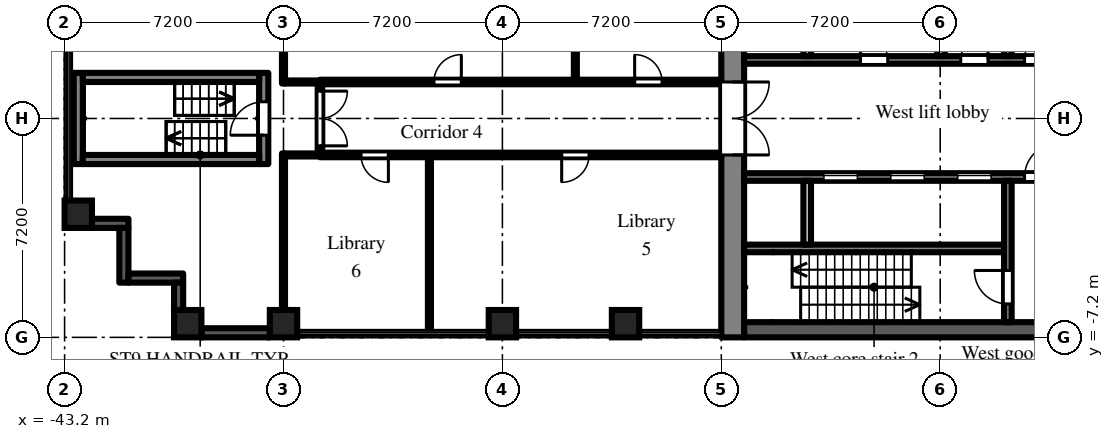
"""IFC4 building model, lengths in metres.
Left out: names, types, materials, properties, quantities, classifications, styles, units other than length and angle.
Written with IfcOpenShell. Run it as: python <this file> out.ifc"""

import sys

from ifc_helpers import new_model, si_unit, direction, frame, frame_2d, origin, origin_2d, place, context, subcontext, project, spatial, rectangle, extrude, element, fill, save


model = new_model("IFC4")
c1 = context("Model", 3, precision=1e-05, world=origin(), true_north=direction((0.0, 1.0)))
c2 = subcontext(c1, "Body", "Model", "MODEL_VIEW")
j1 = project(units=[si_unit("LENGTHUNIT", "METRE"), si_unit("PLANEANGLEUNIT", "RADIAN")], contexts=[c1])
p1 = place(None, origin())
s1 = spatial("IfcSite", under=j1, at=p1, CompositionType="ELEMENT")
p2 = place(p1, origin())
s2 = spatial("IfcBuilding", under=s1, at=p2, CompositionType="ELEMENT")
p3 = place(p2, frame((0.0, 0.0, 7.2)))
s3 = spatial("IfcBuildingStorey", under=s2, at=p3, CompositionType="ELEMENT", Elevation=7.2)
for number, where, z_axis, x_axis in (
    (1, (-42.75, -3.15, 0.0), (0.0, 0.0, 1.0), (1.0, 0.0, 0.0)),
    (2, (-39.15, -6.75, 0.0), (0.0, 0.0, 1.0), (1.0, 0.0, 0.0)),
    (3, (-36.0, -6.75, 0.0), (0.0, 0.0, 1.0), (1.0, 0.0, 0.0)),
    (4, (-28.8, -6.75, 0.0), (0.0, 0.0, 1.0), (1.0, 0.0, 0.0)),
    (5, (-24.75, -6.75, 0.0), (0.0, 0.0, 1.0), (1.0, 0.0, 0.0)),
):
    element("IfcColumn", number, at=place(p3, frame(where, z_axis=z_axis, x_axis=x_axis)), inside=s3, PredefinedType="COLUMN", context=c2, shape_type="SweptSolid", body=[
        extrude(rectangle(XDim=0.9, YDim=0.9, at=origin_2d()), origin(), (0.0, 0.0, 1.0), 4.5),
    ])
p4 = place(p3, frame((-42.3, -3.45, 0.0), z_axis=(0.0, 0.0, 1.0), x_axis=(1.0, 0.0, 0.0)))
e6 = element("IfcWall", 6, at=p4, inside=s3, PredefinedType="SOLIDWALL", context=c2, shape_type="SweptSolid", body=[
    extrude(rectangle(XDim=1.2, YDim=0.3, at=frame_2d((0.6, 0.0))), origin(), (0.0, 0.0, 1.0), 4.075),
])
p5 = place(p3, frame((-41.25, -3.6, 0.0), z_axis=(0.0, 0.0, 1.0), x_axis=(0.0, -1.0, 0.0)))
e7 = element("IfcWall", 7, at=p5, inside=s3, PredefinedType="SOLIDWALL", context=c2, shape_type="SweptSolid", body=[
    extrude(rectangle(XDim=1.8, YDim=0.3, at=frame_2d((0.9, 0.0))), origin(), (0.0, 0.0, 1.0), 4.075),
])
p6 = place(p3, frame((-41.1, -5.25, 0.0), z_axis=(0.0, 0.0, 1.0), x_axis=(1.0, 0.0, 0.0)))
e8 = element("IfcWall", 8, at=p6, inside=s3, PredefinedType="SOLIDWALL", context=c2, shape_type="SweptSolid", body=[
    extrude(rectangle(XDim=1.8, YDim=0.3, at=frame_2d((0.9, 0.0))), origin(), (0.0, 0.0, 1.0), 4.075),
])
p7 = place(p3, frame((-39.45, -5.4, 0.0), z_axis=(0.0, 0.0, 1.0), x_axis=(0.0, -1.0, 0.0)))
e9 = element("IfcWall", 9, at=p7, inside=s3, PredefinedType="SOLIDWALL", context=c2, shape_type="SweptSolid", body=[
    extrude(rectangle(XDim=0.9, YDim=0.3, at=frame_2d((0.45, 0.0))), origin(), (0.0, 0.0, 1.0), 4.075),
])
p8 = place(p3, frame((-38.7, -7.05, 0.0), z_axis=(0.0, 0.0, 1.0), x_axis=(1.0, 0.0, 0.0)))
e10 = element("IfcWall", 10, at=p8, inside=s3, PredefinedType="SOLIDWALL", context=c2, shape_type="SweptSolid", body=[
    extrude(rectangle(XDim=2.25, YDim=0.3, at=frame_2d((1.125, 0.0))), origin(), (0.0, 0.0, 1.0), 3.6),
])
p9 = place(p3, frame((-21.225, -7.2, 0.0), z_axis=(0.0, 0.0, 1.0), x_axis=(0.0, 1.0, 0.0)))
e11 = element("IfcWall", 11, at=p9, inside=s3, PredefinedType="SHEAR", context=c2, shape_type="SweptSolid", body=[
    extrude(rectangle(XDim=14.4, YDim=0.75, at=frame_2d((7.2, 0.0))), origin(), (0.0, 0.0, 1.0), 4.075),
])
p10 = place(p9, frame((6.0, 0.0, 0.0)))
e12 = element("IfcOpeningElement", 12, at=p10, cuts=e11, PredefinedType="OPENING", context=c2, shape_type="SweptSolid", body=[
    extrude(rectangle(XDim=2.4, YDim=2.2, at=frame_2d((1.2, 1.1))), frame((0.0, 0.385, 0.0), z_axis=(0.0, -1.0, 0.0), x_axis=(1.0, 0.0, 0.0)), (0.0, 0.0, 1.0), 0.77),
])
p11 = place(p3, frame((-7.9, 1.925, 0.0), z_axis=(0.0, 0.0, 1.0), x_axis=(-1.0, 0.0, 0.0)))
e13 = element("IfcWall", 13, at=p11, inside=s3, PredefinedType="SHEAR", context=c2, shape_type="SweptSolid", body=[
    extrude(rectangle(XDim=12.95, YDim=0.25, at=frame_2d((6.475, 0.0))), origin(), (0.0, 0.0, 1.0), 4.075),
])
p12 = place(p11, frame((0.525, 0.0, 0.0)))
e14 = element("IfcOpeningElement", 14, at=p12, cuts=e13, PredefinedType="OPENING", context=c2, shape_type="SweptSolid", body=[
    extrude(rectangle(XDim=0.9, YDim=2.1, at=frame_2d((0.45, 1.05))), frame((0.0, 0.135, 0.0), z_axis=(0.0, -1.0, 0.0), x_axis=(1.0, 0.0, 0.0)), (0.0, 0.0, 1.0), 0.27),
])
p13 = place(p11, frame((2.625, 0.0, 0.0)))
e15 = element("IfcOpeningElement", 15, at=p13, cuts=e13, PredefinedType="OPENING", context=c2, shape_type="SweptSolid", body=[
    extrude(rectangle(XDim=1.1, YDim=2.1, at=frame_2d((0.55, 1.05))), frame((0.0, 0.135, 0.0), z_axis=(0.0, -1.0, 0.0), x_axis=(1.0, 0.0, 0.0)), (0.0, 0.0, 1.0), 0.27),
])
p14 = place(p11, frame((4.925, 0.0, 0.0)))
e16 = element("IfcOpeningElement", 16, at=p14, cuts=e13, PredefinedType="OPENING", context=c2, shape_type="SweptSolid", body=[
    extrude(rectangle(XDim=0.9, YDim=2.1, at=frame_2d((0.45, 1.05))), frame((0.0, 0.135, 0.0), z_axis=(0.0, -1.0, 0.0), x_axis=(1.0, 0.0, 0.0)), (0.0, 0.0, 1.0), 0.27),
])
p15 = place(p11, frame((8.225, 0.0, 0.0)))
e17 = element("IfcOpeningElement", 17, at=p15, cuts=e13, PredefinedType="OPENING", context=c2, shape_type="SweptSolid", body=[
    extrude(rectangle(XDim=0.9, YDim=2.1, at=frame_2d((0.45, 1.05))), frame((0.0, 0.135, 0.0), z_axis=(0.0, -1.0, 0.0), x_axis=(1.0, 0.0, 0.0)), (0.0, 0.0, 1.0), 0.27),
])
p16 = place(p3, frame((-12.175, 2.05, 0.0), z_axis=(0.0, 0.0, 1.0), x_axis=(0.0, 1.0, 0.0)))
e18 = element("IfcWall", 18, at=p16, inside=s3, PredefinedType="SHEAR", context=c2, shape_type="SweptSolid", body=[
    extrude(rectangle(XDim=4.65, YDim=0.25, at=frame_2d((2.325, 0.0))), origin(), (0.0, 0.0, 1.0), 4.075),
])
p17 = place(p16, frame((2.95, 0.0, 0.0)))
e19 = element("IfcOpeningElement", 19, at=p17, cuts=e18, PredefinedType="OPENING", context=c2, shape_type="SweptSolid", body=[
    extrude(rectangle(XDim=1.1, YDim=2.1, at=frame_2d((0.55, 1.05))), frame((0.0, 0.135, 0.0), z_axis=(0.0, -1.0, 0.0), x_axis=(1.0, 0.0, 0.0)), (0.0, 0.0, 1.0), 0.27),
])
for number, where, z_axis, x_axis in (
    (20, (-14.375, 2.05, 0.0), (0.0, 0.0, 1.0), (0.0, 1.0, 0.0)),
    (21, (-18.775, 2.05, 0.0), (0.0, 0.0, 1.0), (0.0, 1.0, 0.0)),
):
    element("IfcWall", number, at=place(p3, frame(where, z_axis=z_axis, x_axis=x_axis)), inside=s3, PredefinedType="PARTITIONING", context=c2, shape_type="SweptSolid", body=[
        extrude(rectangle(XDim=2.1, YDim=0.25, at=frame_2d((1.05, 0.0))), origin(), (0.0, 0.0, 1.0), 4.075),
    ])
p18 = place(p3, frame((-7.9, -6.95, 0.0), z_axis=(0.0, 0.0, 1.0), x_axis=(-1.0, 0.0, 0.0)))
e22 = element("IfcWall", 22, at=p18, inside=s3, PredefinedType="SHEAR", context=c2, shape_type="SweptSolid", body=[
    extrude(rectangle(XDim=12.95, YDim=0.5, at=frame_2d((6.475, 0.0))), origin(), (0.0, 0.0, 1.0), 4.075),
])
p19 = place(p3, frame((-7.9, -1.925, 0.0), z_axis=(0.0, 0.0, 1.0), x_axis=(-1.0, 0.0, 0.0)))
e23 = element("IfcWall", 23, at=p19, inside=s3, PredefinedType="SHEAR", context=c2, shape_type="SweptSolid", body=[
    extrude(rectangle(XDim=12.95, YDim=0.25, at=frame_2d((6.475, 0.0))), origin(), (0.0, 0.0, 1.0), 4.075),
])
p20 = place(p19, frame((4.825, 0.0, 0.0)))
e24 = element("IfcOpeningElement", 24, at=p20, cuts=e23, PredefinedType="OPENING", context=c2, shape_type="SweptSolid", body=[
    extrude(rectangle(XDim=1.1, YDim=2.1, at=frame_2d((0.55, 1.05))), frame((0.0, 0.135, 0.0), z_axis=(0.0, -1.0, 0.0), x_axis=(1.0, 0.0, 0.0)), (0.0, 0.0, 1.0), 0.27),
])
p21 = place(p19, frame((7.025, 0.0, 0.0)))
e25 = element("IfcOpeningElement", 25, at=p21, cuts=e23, PredefinedType="OPENING", context=c2, shape_type="SweptSolid", body=[
    extrude(rectangle(XDim=1.1, YDim=2.1, at=frame_2d((0.55, 1.05))), frame((0.0, 0.135, 0.0), z_axis=(0.0, -1.0, 0.0), x_axis=(1.0, 0.0, 0.0)), (0.0, 0.0, 1.0), 0.27),
])
p22 = place(p19, frame((9.225, 0.0, 0.0)))
e26 = element("IfcOpeningElement", 26, at=p22, cuts=e23, PredefinedType="OPENING", context=c2, shape_type="SweptSolid", body=[
    extrude(rectangle(XDim=1.1, YDim=2.1, at=frame_2d((0.55, 1.05))), frame((0.0, 0.135, 0.0), z_axis=(0.0, -1.0, 0.0), x_axis=(1.0, 0.0, 0.0)), (0.0, 0.0, 1.0), 0.27),
])
p23 = place(p19, frame((0.525, 0.0, 0.0)))
e27 = element("IfcOpeningElement", 27, at=p23, cuts=e23, PredefinedType="OPENING", context=c2, shape_type="SweptSolid", body=[
    extrude(rectangle(XDim=0.9, YDim=2.1, at=frame_2d((0.45, 1.05))), frame((0.0, 0.135, 0.0), z_axis=(0.0, -1.0, 0.0), x_axis=(1.0, 0.0, 0.0)), (0.0, 0.0, 1.0), 0.27),
])
p24 = place(p19, frame((2.625, 0.0, 0.0)))
e28 = element("IfcOpeningElement", 28, at=p24, cuts=e23, PredefinedType="OPENING", context=c2, shape_type="SweptSolid", body=[
    extrude(rectangle(XDim=1.1, YDim=2.1, at=frame_2d((0.55, 1.05))), frame((0.0, 0.135, 0.0), z_axis=(0.0, -1.0, 0.0), x_axis=(1.0, 0.0, 0.0)), (0.0, 0.0, 1.0), 0.27),
])
p25 = place(p3, frame((-12.3, -4.275, 0.0), z_axis=(0.0, 0.0, 1.0), x_axis=(-1.0, 0.0, 0.0)))
e29 = element("IfcWall", 29, at=p25, inside=s3, PredefinedType="SHEAR", context=c2, shape_type="SweptSolid", body=[
    extrude(rectangle(XDim=8.55, YDim=0.25, at=frame_2d((4.275, 0.0))), origin(), (0.0, 0.0, 1.0), 4.075),
])
p26 = place(p3, frame((-12.175, -2.05, 0.0), z_axis=(0.0, 0.0, 1.0), x_axis=(0.0, -1.0, 0.0)))
e30 = element("IfcWall", 30, at=p26, inside=s3, PredefinedType="SHEAR", context=c2, shape_type="SweptSolid", body=[
    extrude(rectangle(XDim=4.65, YDim=0.25, at=frame_2d((2.325, 0.0))), origin(), (0.0, 0.0, 1.0), 4.075),
])
p27 = place(p26, frame((2.95, 0.0, 0.0)))
e31 = element("IfcOpeningElement", 31, at=p27, cuts=e30, PredefinedType="OPENING", context=c2, shape_type="SweptSolid", body=[
    extrude(rectangle(XDim=1.1, YDim=2.1, at=frame_2d((0.55, 1.05))), frame((0.0, 0.135, 0.0), z_axis=(0.0, -1.0, 0.0), x_axis=(1.0, 0.0, 0.0)), (0.0, 0.0, 1.0), 0.27),
])
p28 = place(p3, frame((-18.775, -2.05, 0.0), z_axis=(0.0, 0.0, 1.0), x_axis=(0.0, -1.0, 0.0)))
e32 = element("IfcWall", 32, at=p28, inside=s3, PredefinedType="PARTITIONING", context=c2, shape_type="SweptSolid", body=[
    extrude(rectangle(XDim=2.1, YDim=0.25, at=frame_2d((1.05, 0.0))), origin(), (0.0, 0.0, 1.0), 4.075),
])
p29 = place(p3, frame((-36.65, -1.5, 0.0), z_axis=(0.0, 0.0, 1.0), x_axis=(0.0, 1.0, 0.0)))
e33 = element("IfcWall", 33, at=p29, inside=s3, PredefinedType="SHEAR", context=c2, shape_type="SweptSolid", body=[
    extrude(rectangle(XDim=3.0, YDim=0.3, at=frame_2d((1.5, 0.0))), origin(), (0.0, 0.0, 1.0), 4.075),
])
p30 = place(p29, frame((0.95, 0.0, 0.0)))
e34 = element("IfcOpeningElement", 34, at=p30, cuts=e33, PredefinedType="OPENING", context=c2, shape_type="SweptSolid", body=[
    extrude(rectangle(XDim=1.1, YDim=2.1, at=frame_2d((0.55, 1.05))), frame((0.0, 0.16, 0.0), z_axis=(0.0, -1.0, 0.0), x_axis=(1.0, 0.0, 0.0)), (0.0, 0.0, 1.0), 0.32),
])
p31 = place(p3, frame((-42.75, -1.5, 0.0), z_axis=(0.0, 0.0, 1.0), x_axis=(0.0, 1.0, 0.0)))
e35 = element("IfcWall", 35, at=p31, inside=s3, PredefinedType="SHEAR", context=c2, shape_type="SweptSolid", body=[
    extrude(rectangle(XDim=3.0, YDim=0.3, at=frame_2d((1.5, 0.0))), origin(), (0.0, 0.0, 1.0), 4.075),
])
for number, where, z_axis, x_axis in (
    (36, (-36.8, -1.35, 0.0), (0.0, 0.0, 1.0), (-1.0, 0.0, 0.0)),
    (37, (-36.8, 1.35, 0.0), (0.0, 0.0, 1.0), (-1.0, 0.0, 0.0)),
):
    element("IfcWall", number, at=place(p3, frame(where, z_axis=z_axis, x_axis=x_axis)), inside=s3, PredefinedType="SHEAR", context=c2, shape_type="SweptSolid", body=[
        extrude(rectangle(XDim=5.8, YDim=0.3, at=frame_2d((2.9, 0.0))), origin(), (0.0, 0.0, 1.0), 4.075),
    ])
p32 = place(p3, frame((-36.0, -6.9, 0.0), z_axis=(0.0, 0.0, 1.0), x_axis=(0.0, 1.0, 0.0)))
e38 = element("IfcWall", 38, at=p32, inside=s3, PredefinedType="PARTITIONING", context=c2, shape_type="SweptSolid", body=[
    extrude(rectangle(XDim=5.75, YDim=0.1, at=frame_2d((2.875, 0.0))), origin(), (0.0, 0.0, 1.0), 4.075),
])
p33 = place(p3, frame((-35.95, -1.2, 0.0), z_axis=(0.0, 0.0, 1.0), x_axis=(1.0, 0.0, 0.0)))
e39 = element("IfcWall", 39, at=p33, inside=s3, PredefinedType="PARTITIONING", context=c2, shape_type="SweptSolid", body=[
    extrude(rectangle(XDim=1.15, YDim=0.1, at=frame_2d((0.575, 0.0))), origin(), (0.0, 0.0, 1.0), 4.075),
])
p34 = place(p3, frame((-36.0, 1.15, 0.0), z_axis=(0.0, 0.0, 1.0), x_axis=(0.0, 1.0, 0.0)))
e40 = element("IfcWall", 40, at=p34, inside=s3, PredefinedType="PARTITIONING", context=c2, shape_type="SweptSolid", body=[
    extrude(rectangle(XDim=5.75, YDim=0.1, at=frame_2d((2.875, 0.0))), origin(), (0.0, 0.0, 1.0), 4.075),
])
p35 = place(p3, frame((-35.95, 1.2, 0.0), z_axis=(0.0, 0.0, 1.0), x_axis=(1.0, 0.0, 0.0)))
e41 = element("IfcWall", 41, at=p35, inside=s3, PredefinedType="PARTITIONING", context=c2, shape_type="SweptSolid", body=[
    extrude(rectangle(XDim=1.15, YDim=0.1, at=frame_2d((0.575, 0.0))), origin(), (0.0, 0.0, 1.0), 4.075),
])
p36 = place(p3, frame((-34.8, -1.125, 0.0), z_axis=(0.0, 0.0, 1.0), x_axis=(0.0, 1.0, 0.0)))
e42 = element("IfcWall", 42, at=p36, inside=s3, PredefinedType="PARTITIONING", context=c2, shape_type="SweptSolid", body=[
    extrude(rectangle(XDim=2.25, YDim=0.15, at=frame_2d((1.125, 0.0))), origin(), (0.0, 0.0, 1.0), 4.075),
])
p37 = place(p36, frame((0.225, 0.0, 0.0)))
e43 = element("IfcOpeningElement", 43, at=p37, cuts=e42, PredefinedType="OPENING", context=c2, shape_type="SweptSolid", body=[
    extrude(rectangle(XDim=1.8, YDim=2.1, at=frame_2d((0.9, 1.05))), frame((0.0, 0.085, 0.0), z_axis=(0.0, -1.0, 0.0), x_axis=(1.0, 0.0, 0.0)), (0.0, 0.0, 1.0), 0.17),
])
p38 = place(p3, frame((-34.8, -1.2, 0.0), z_axis=(0.0, 0.0, 1.0), x_axis=(1.0, 0.0, 0.0)))
e44 = element("IfcWall", 44, at=p38, inside=s3, PredefinedType="PARTITIONING", context=c2, shape_type="SweptSolid", body=[
    extrude(rectangle(XDim=13.2, YDim=0.15, at=frame_2d((6.6, 0.0))), origin(), (0.0, 0.0, 1.0), 4.075),
])
p39 = place(p38, frame((7.95, 0.0, 0.0)))
e45 = element("IfcOpeningElement", 45, at=p39, cuts=e44, PredefinedType="OPENING", context=c2, shape_type="SweptSolid", body=[
    extrude(rectangle(XDim=0.9, YDim=2.1, at=frame_2d((0.45, 1.05))), frame((0.0, 0.085, 0.0), z_axis=(0.0, -1.0, 0.0), x_axis=(1.0, 0.0, 0.0)), (0.0, 0.0, 1.0), 0.17),
])
p40 = place(p38, frame((1.35, 0.0, 0.0)))
e46 = element("IfcOpeningElement", 46, at=p40, cuts=e44, PredefinedType="OPENING", context=c2, shape_type="SweptSolid", body=[
    extrude(rectangle(XDim=0.9, YDim=2.1, at=frame_2d((0.45, 1.05))), frame((0.0, 0.085, 0.0), z_axis=(0.0, -1.0, 0.0), x_axis=(1.0, 0.0, 0.0)), (0.0, 0.0, 1.0), 0.17),
])
p41 = place(p3, frame((-34.8, 1.2, 0.0), z_axis=(0.0, 0.0, 1.0), x_axis=(1.0, 0.0, 0.0)))
e47 = element("IfcWall", 47, at=p41, inside=s3, PredefinedType="PARTITIONING", context=c2, shape_type="SweptSolid", body=[
    extrude(rectangle(XDim=13.2, YDim=0.15, at=frame_2d((6.6, 0.0))), origin(), (0.0, 0.0, 1.0), 4.075),
])
p42 = place(p41, frame((10.35, 0.0, 0.0)))
e48 = element("IfcOpeningElement", 48, at=p42, cuts=e47, PredefinedType="OPENING", context=c2, shape_type="SweptSolid", body=[
    extrude(rectangle(XDim=0.9, YDim=2.1, at=frame_2d((0.45, 1.05))), frame((0.0, 0.085, 0.0), z_axis=(0.0, -1.0, 0.0), x_axis=(1.0, 0.0, 0.0)), (0.0, 0.0, 1.0), 0.17),
])
p43 = place(p41, frame((3.75, 0.0, 0.0)))
e49 = element("IfcOpeningElement", 49, at=p43, cuts=e47, PredefinedType="OPENING", context=c2, shape_type="SweptSolid", body=[
    extrude(rectangle(XDim=0.9, YDim=2.1, at=frame_2d((0.45, 1.05))), frame((0.0, 0.085, 0.0), z_axis=(0.0, -1.0, 0.0), x_axis=(1.0, 0.0, 0.0)), (0.0, 0.0, 1.0), 0.17),
])
for number, where, z_axis, x_axis in (
    (50, (-31.2, -7.02, 0.0), (0.0, 0.0, 1.0), (0.0, 1.0, 0.0)),
    (51, (-26.4, 1.275, 0.0), (0.0, 0.0, 1.0), (0.0, 1.0, 0.0)),
):
    element("IfcWall", number, at=place(p3, frame(where, z_axis=z_axis, x_axis=x_axis)), inside=s3, PredefinedType="PARTITIONING", context=c2, shape_type="SweptSolid", body=[
        extrude(rectangle(XDim=5.745, YDim=0.1, at=frame_2d((2.873, 0.0))), origin(), (0.0, 0.0, 1.0), 4.075),
    ])
p44 = place(p20, origin())
e52 = element("IfcDoor", 52, at=p44, inside=s3, OperationType="SLIDING_TO_LEFT", PredefinedType="DOOR", context=c2, shape_type="SweptSolid", body=[
    extrude(rectangle(XDim=1.1, YDim=2.1, at=frame_2d((0.55, 1.05))), frame((0.0, 0.025, 0.0), z_axis=(0.0, -1.0, 0.0), x_axis=(1.0, 0.0, 0.0)), (0.0, 0.0, 1.0), 0.05),
])
fill(e24, e52)
p45 = place(p21, origin())
e53 = element("IfcDoor", 53, at=p45, inside=s3, OperationType="SLIDING_TO_LEFT", PredefinedType="DOOR", context=c2, shape_type="SweptSolid", body=[
    extrude(rectangle(XDim=1.1, YDim=2.1, at=frame_2d((0.55, 1.05))), frame((0.0, 0.025, 0.0), z_axis=(0.0, -1.0, 0.0), x_axis=(1.0, 0.0, 0.0)), (0.0, 0.0, 1.0), 0.05),
])
fill(e25, e53)
p46 = place(p22, origin())
e54 = element("IfcDoor", 54, at=p46, inside=s3, OperationType="SLIDING_TO_LEFT", PredefinedType="DOOR", context=c2, shape_type="SweptSolid", body=[
    extrude(rectangle(XDim=1.1, YDim=2.1, at=frame_2d((0.55, 1.05))), frame((0.0, 0.025, 0.0), z_axis=(0.0, -1.0, 0.0), x_axis=(1.0, 0.0, 0.0)), (0.0, 0.0, 1.0), 0.05),
])
fill(e26, e54)
p47 = place(p27, frame((1.1, 0.0, 0.0), z_axis=(0.0, 0.0, 1.0), x_axis=(-1.0, 0.0, 0.0)))
e55 = element("IfcDoor", 55, at=p47, inside=s3, OperationType="SINGLE_SWING_RIGHT", PredefinedType="DOOR", context=c2, shape_type="SweptSolid", body=[
    extrude(rectangle(XDim=1.1, YDim=2.1, at=frame_2d((0.55, 1.05))), frame((0.0, 0.025, 0.0), z_axis=(0.0, -1.0, 0.0), x_axis=(1.0, 0.0, 0.0)), (0.0, 0.0, 1.0), 0.05),
])
fill(e31, e55)
p48 = place(p13, frame((1.1, 0.0, 0.0), z_axis=(0.0, 0.0, 1.0), x_axis=(-1.0, 0.0, 0.0)))
e56 = element("IfcDoor", 56, at=p48, inside=s3, OperationType="SINGLE_SWING_RIGHT", PredefinedType="DOOR", context=c2, shape_type="SweptSolid", body=[
    extrude(rectangle(XDim=1.1, YDim=2.1, at=frame_2d((0.55, 1.05))), frame((0.0, 0.025, 0.0), z_axis=(0.0, -1.0, 0.0), x_axis=(1.0, 0.0, 0.0)), (0.0, 0.0, 1.0), 0.05),
])
fill(e15, e56)
p49 = place(p24, frame((1.1, 0.0, 0.0), z_axis=(0.0, 0.0, 1.0), x_axis=(-1.0, 0.0, 0.0)))
e57 = element("IfcDoor", 57, at=p49, inside=s3, OperationType="SINGLE_SWING_RIGHT", PredefinedType="DOOR", context=c2, shape_type="SweptSolid", body=[
    extrude(rectangle(XDim=1.1, YDim=2.1, at=frame_2d((0.55, 1.05))), frame((0.0, 0.025, 0.0), z_axis=(0.0, -1.0, 0.0), x_axis=(1.0, 0.0, 0.0)), (0.0, 0.0, 1.0), 0.05),
])
fill(e28, e57)
p50 = place(p10, frame((2.4, 0.0, 0.0), z_axis=(0.0, 0.0, 1.0), x_axis=(-1.0, 0.0, 0.0)))
e58 = element("IfcDoor", 58, at=p50, inside=s3, OperationType="DOUBLE_DOOR_DOUBLE_SWING", PredefinedType="DOOR", context=c2, shape_type="SweptSolid", body=[
    extrude(rectangle(XDim=2.4, YDim=2.2, at=frame_2d((1.2, 1.1))), frame((0.0, 0.025, 0.0), z_axis=(0.0, -1.0, 0.0), x_axis=(1.0, 0.0, 0.0)), (0.0, 0.0, 1.0), 0.05),
])
fill(e12, e58)
p51 = place(p14, frame((0.9, 0.0, 0.0), z_axis=(0.0, 0.0, 1.0), x_axis=(-1.0, 0.0, 0.0)))
e59 = element("IfcDoor", 59, at=p51, inside=s3, OperationType="SINGLE_SWING_RIGHT", PredefinedType="DOOR", context=c2, shape_type="SweptSolid", body=[
    extrude(rectangle(XDim=0.9, YDim=2.1, at=frame_2d((0.45, 1.05))), frame((0.0, 0.025, 0.0), z_axis=(0.0, -1.0, 0.0), x_axis=(1.0, 0.0, 0.0)), (0.0, 0.0, 1.0), 0.05),
])
fill(e16, e59)
p52 = place(p15, frame((0.9, 0.0, 0.0), z_axis=(0.0, 0.0, 1.0), x_axis=(-1.0, 0.0, 0.0)))
e60 = element("IfcDoor", 60, at=p52, inside=s3, OperationType="SINGLE_SWING_LEFT", PredefinedType="DOOR", context=c2, shape_type="SweptSolid", body=[
    extrude(rectangle(XDim=0.9, YDim=2.1, at=frame_2d((0.45, 1.05))), frame((0.0, 0.025, 0.0), z_axis=(0.0, -1.0, 0.0), x_axis=(1.0, 0.0, 0.0)), (0.0, 0.0, 1.0), 0.05),
])
fill(e17, e60)
p53 = place(p30, origin())
e61 = element("IfcDoor", 61, at=p53, inside=s3, OperationType="SINGLE_SWING_LEFT", PredefinedType="DOOR", context=c2, shape_type="SweptSolid", body=[
    extrude(rectangle(XDim=1.1, YDim=2.1, at=frame_2d((0.55, 1.05))), frame((0.0, 0.025, 0.0), z_axis=(0.0, -1.0, 0.0), x_axis=(1.0, 0.0, 0.0)), (0.0, 0.0, 1.0), 0.05),
])
fill(e34, e61)
p54 = place(p37, frame((1.8, 0.0, 0.0), z_axis=(0.0, 0.0, 1.0), x_axis=(-1.0, 0.0, 0.0)))
e62 = element("IfcDoor", 62, at=p54, inside=s3, OperationType="DOUBLE_DOOR_DOUBLE_SWING", PredefinedType="DOOR", context=c2, shape_type="SweptSolid", body=[
    extrude(rectangle(XDim=1.8, YDim=2.1, at=frame_2d((0.9, 1.05))), frame((0.0, 0.025, 0.0), z_axis=(0.0, -1.0, 0.0), x_axis=(1.0, 0.0, 0.0)), (0.0, 0.0, 1.0), 0.05),
])
fill(e43, e62)
p55 = place(p39, frame((0.9, 0.0, 0.0), z_axis=(0.0, 0.0, 1.0), x_axis=(-1.0, 0.0, 0.0)))
e63 = element("IfcDoor", 63, at=p55, inside=s3, OperationType="SINGLE_SWING_RIGHT", PredefinedType="DOOR", context=c2, shape_type="SweptSolid", body=[
    extrude(rectangle(XDim=0.9, YDim=2.1, at=frame_2d((0.45, 1.05))), frame((0.0, 0.025, 0.0), z_axis=(0.0, -1.0, 0.0), x_axis=(1.0, 0.0, 0.0)), (0.0, 0.0, 1.0), 0.05),
])
fill(e45, e63)
p56 = place(p40, frame((0.9, 0.0, 0.0), z_axis=(0.0, 0.0, 1.0), x_axis=(-1.0, 0.0, 0.0)))
e64 = element("IfcDoor", 64, at=p56, inside=s3, OperationType="SINGLE_SWING_LEFT", PredefinedType="DOOR", context=c2, shape_type="SweptSolid", body=[
    extrude(rectangle(XDim=0.9, YDim=2.1, at=frame_2d((0.45, 1.05))), frame((0.0, 0.025, 0.0), z_axis=(0.0, -1.0, 0.0), x_axis=(1.0, 0.0, 0.0)), (0.0, 0.0, 1.0), 0.05),
])
fill(e46, e64)
p57 = place(p42, origin())
e65 = element("IfcDoor", 65, at=p57, inside=s3, OperationType="SINGLE_SWING_LEFT", PredefinedType="DOOR", context=c2, shape_type="SweptSolid", body=[
    extrude(rectangle(XDim=0.9, YDim=2.1, at=frame_2d((0.45, 1.05))), frame((0.0, 0.025, 0.0), z_axis=(0.0, -1.0, 0.0), x_axis=(1.0, 0.0, 0.0)), (0.0, 0.0, 1.0), 0.05),
])
fill(e48, e65)
p58 = place(p43, origin())
e66 = element("IfcDoor", 66, at=p58, inside=s3, OperationType="SINGLE_SWING_RIGHT", PredefinedType="DOOR", context=c2, shape_type="SweptSolid", body=[
    extrude(rectangle(XDim=0.9, YDim=2.1, at=frame_2d((0.45, 1.05))), frame((0.0, 0.025, 0.0), z_axis=(0.0, -1.0, 0.0), x_axis=(1.0, 0.0, 0.0)), (0.0, 0.0, 1.0), 0.05),
])
fill(e49, e66)
save(model, sys.argv[1])
